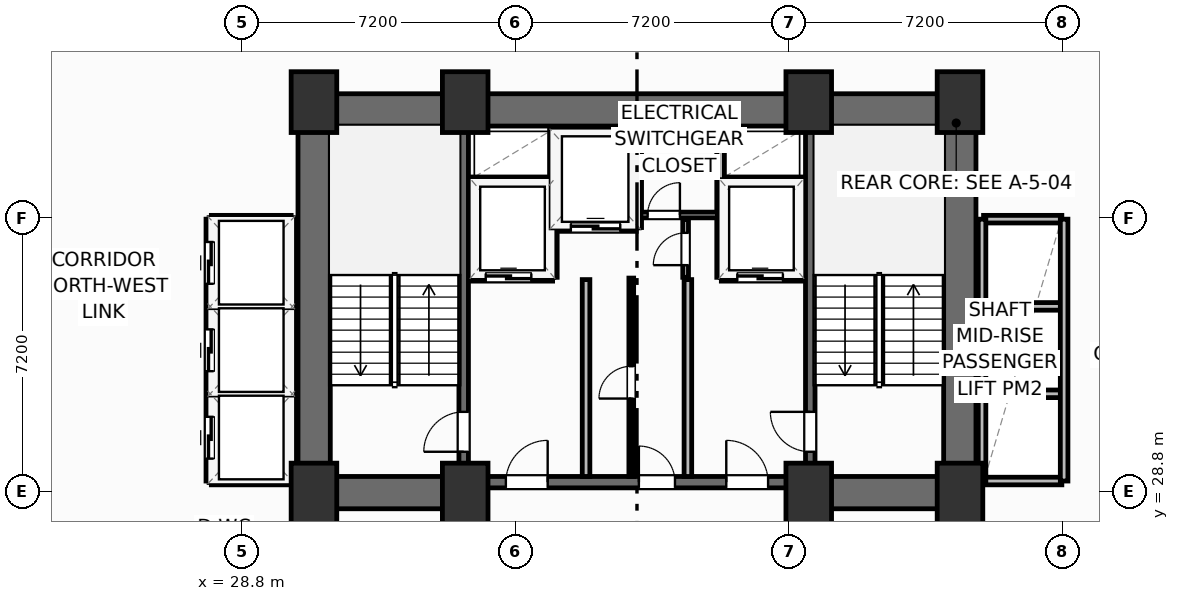
"""IFC4 building model, lengths in metres.
Left out: names, types, materials, properties, quantities, classifications, styles, units other than length and angle.
Written with IfcOpenShell. Run it as: python <this file> out.ifc"""

import sys

from ifc_helpers import new_model, si_unit, direction, frame, frame_2d, origin, origin_2d, place, context, subcontext, project, spatial, rectangle, extrude, element, fill, save


model = new_model("IFC4")
c1 = context("Model", 3, precision=1e-05, world=origin(), true_north=direction((0.0, 1.0)))
c2 = subcontext(c1, "Body", "Model", "MODEL_VIEW")
j1 = project(units=[si_unit("LENGTHUNIT", "METRE"), si_unit("PLANEANGLEUNIT", "RADIAN")], contexts=[c1])
p1 = place(None, origin())
s1 = spatial("IfcSite", under=j1, at=p1, CompositionType="ELEMENT")
p2 = place(p1, origin())
s2 = spatial("IfcBuilding", under=s1, at=p2, CompositionType="ELEMENT")
p3 = place(p2, frame((0.0, 0.0, 45.5)))
s3 = spatial("IfcBuildingStorey", under=s2, at=p3, CompositionType="ELEMENT", Elevation=45.5)
for number, where, z_axis, x_axis in (
    (1, (30.7, 28.75, 0.0), (0.0, 0.0, 1.0), (1.0, 0.0, 0.0)),
    (2, (34.68, 28.75, 0.0), (0.0, 0.0, 1.0), (1.0, 0.0, 0.0)),
    (3, (43.72, 28.75, 0.0), (0.0, 0.0, 1.0), (1.0, 0.0, 0.0)),
    (4, (47.7, 28.75, 0.0), (0.0, 0.0, 1.0), (1.0, 0.0, 0.0)),
    (5, (30.7, 39.05, 0.0), (0.0, 0.0, 1.0), (1.0, 0.0, 0.0)),
    (6, (34.68, 39.05, 0.0), (0.0, 0.0, 1.0), (1.0, 0.0, 0.0)),
    (7, (43.72, 39.05, 0.0), (0.0, 0.0, 1.0), (1.0, 0.0, 0.0)),
    (8, (47.7, 39.05, 0.0), (0.0, 0.0, 1.0), (1.0, 0.0, 0.0)),
):
    element("IfcColumn", number, at=place(p3, frame(where, z_axis=z_axis, x_axis=x_axis)), inside=s3, PredefinedType="COLUMN", context=c2, shape_type="SweptSolid", body=[
        extrude(rectangle(XDim=1.2, YDim=1.6, at=origin_2d()), origin(), (0.0, 0.0, 1.0), 3.7),
    ])
p4 = place(p3, frame((30.28, 38.845, 0.0), z_axis=(0.0, 0.0, 1.0), x_axis=(1.0, 0.0, 0.0)))
e9 = element("IfcWall", 9, at=p4, inside=s3, PredefinedType="SHEAR", context=c2, shape_type="SweptSolid", body=[
    extrude(rectangle(XDim=17.84, YDim=0.85, at=frame_2d((8.92, 0.0))), origin(), (0.0, 0.0, 1.0), 3.45),
])
for number, where, z_axis, x_axis in (
    (10, (30.705, 29.2, 0.0), (0.0, 0.0, 1.0), (0.0, 1.0, 0.0)),
    (11, (47.695, 29.2, 0.0), (0.0, 0.0, 1.0), (0.0, 1.0, 0.0)),
):
    element("IfcWall", number, at=place(p3, frame(where, z_axis=z_axis, x_axis=x_axis)), inside=s3, PredefinedType="SHEAR", context=c2, shape_type="SweptSolid", body=[
        extrude(rectangle(XDim=9.22, YDim=0.85, at=frame_2d((4.61, 0.0))), origin(), (0.0, 0.0, 1.0), 3.45),
    ])
for number, where, z_axis, x_axis in (
    (12, (30.28, 28.775, 0.0), (0.0, 0.0, 1.0), (1.0, 0.0, 0.0)),
    (13, (43.6, 28.775, 0.0), (0.0, 0.0, 1.0), (1.0, 0.0, 0.0)),
):
    element("IfcWall", number, at=place(p3, frame(where, z_axis=z_axis, x_axis=x_axis)), inside=s3, PredefinedType="SHEAR", context=c2, shape_type="SweptSolid", body=[
        extrude(rectangle(XDim=4.52, YDim=0.85, at=frame_2d((2.26, 0.0))), origin(), (0.0, 0.0, 1.0), 3.45),
    ])
p5 = place(p3, frame((34.8, 29.05, 0.0), z_axis=(0.0, 0.0, 1.0), x_axis=(1.0, 0.0, 0.0)))
e14 = element("IfcWall", 14, at=p5, inside=s3, PredefinedType="SHEAR", context=c2, shape_type="SweptSolid", body=[
    extrude(rectangle(XDim=8.8, YDim=0.3, at=frame_2d((4.4, 0.0))), origin(), (0.0, 0.0, 1.0), 3.45),
])
p6 = place(p5, frame((0.95, 0.0, 0.0)))
e15 = element("IfcOpeningElement", 15, at=p6, cuts=e14, PredefinedType="OPENING", context=c2, shape_type="SweptSolid", body=[
    extrude(rectangle(XDim=1.1, YDim=2.15, at=frame_2d((0.55, 1.075))), frame((0.0, 0.16, 0.0), z_axis=(0.0, -1.0, 0.0), x_axis=(1.0, 0.0, 0.0)), (0.0, 0.0, 1.0), 0.32),
])
p7 = place(p5, frame((6.75, 0.0, 0.0)))
e16 = element("IfcOpeningElement", 16, at=p7, cuts=e14, PredefinedType="OPENING", context=c2, shape_type="SweptSolid", body=[
    extrude(rectangle(XDim=1.1, YDim=2.15, at=frame_2d((0.55, 1.075))), frame((0.0, 0.16, 0.0), z_axis=(0.0, -1.0, 0.0), x_axis=(1.0, 0.0, 0.0)), (0.0, 0.0, 1.0), 0.32),
])
p8 = place(p5, frame((4.45, 0.0, 0.0)))
e17 = element("IfcOpeningElement", 17, at=p8, cuts=e14, PredefinedType="OPENING", context=c2, shape_type="SweptSolid", body=[
    extrude(rectangle(XDim=0.95, YDim=2.15, at=frame_2d((0.475, 1.075))), frame((0.0, 0.16, 0.0), z_axis=(0.0, -1.0, 0.0), x_axis=(1.0, 0.0, 0.0)), (0.0, 0.0, 1.0), 0.32),
])
p9 = place(p3, frame((34.64, 29.2, 0.0), z_axis=(0.0, 0.0, 1.0), x_axis=(0.0, 1.0, 0.0)))
e18 = element("IfcWall", 18, at=p9, inside=s3, PredefinedType="SHEAR", context=c2, shape_type="SweptSolid", body=[
    extrude(rectangle(XDim=9.22, YDim=0.25, at=frame_2d((4.61, 0.0))), origin(), (0.0, 0.0, 1.0), 3.45),
])
p10 = place(p9, frame((0.65, 0.0, 0.0)))
e19 = element("IfcOpeningElement", 19, at=p10, cuts=e18, PredefinedType="OPENING", context=c2, shape_type="SweptSolid", body=[
    extrude(rectangle(XDim=1.05, YDim=2.15, at=frame_2d((0.525, 1.075))), frame((0.0, 0.135, 0.0), z_axis=(0.0, -1.0, 0.0), x_axis=(1.0, 0.0, 0.0)), (0.0, 0.0, 1.0), 0.27),
])
p11 = place(p3, frame((43.76, 29.2, 0.0), z_axis=(0.0, 0.0, 1.0), x_axis=(0.0, 1.0, 0.0)))
e20 = element("IfcWall", 20, at=p11, inside=s3, PredefinedType="SHEAR", context=c2, shape_type="SweptSolid", body=[
    extrude(rectangle(XDim=9.22, YDim=0.25, at=frame_2d((4.61, 0.0))), origin(), (0.0, 0.0, 1.0), 3.45),
])
p12 = place(p11, frame((0.65, 0.0, 0.0)))
e21 = element("IfcOpeningElement", 21, at=p12, cuts=e20, PredefinedType="OPENING", context=c2, shape_type="SweptSolid", body=[
    extrude(rectangle(XDim=1.05, YDim=2.15, at=frame_2d((0.525, 1.075))), frame((0.0, 0.135, 0.0), z_axis=(0.0, -1.0, 0.0), x_axis=(1.0, 0.0, 0.0)), (0.0, 0.0, 1.0), 0.27),
])
for number, where, z_axis, x_axis in (
    (22, (37.86, 29.2, 0.0), (0.0, 0.0, 1.0), (0.0, 1.0, 0.0)),
    (23, (40.54, 29.2, 0.0), (0.0, 0.0, 1.0), (0.0, 1.0, 0.0)),
):
    element("IfcWall", number, at=place(p3, frame(where, z_axis=z_axis, x_axis=x_axis)), inside=s3, PredefinedType="PARTITIONING", context=c2, shape_type="SweptSolid", body=[
        extrude(rectangle(XDim=5.18, YDim=0.2, at=frame_2d((2.59, 0.0))), origin(), (0.0, 0.0, 1.0), 3.45),
    ])
p13 = place(p3, frame((34.8, 34.44, 0.0), z_axis=(0.0, 0.0, 1.0), x_axis=(1.0, 0.0, 0.0)))
e24 = element("IfcWall", 24, at=p13, inside=s3, PredefinedType="PARTITIONING", context=c2, shape_type="SweptSolid", body=[
    extrude(rectangle(XDim=2.18, YDim=0.2, at=frame_2d((1.09, 0.0))), origin(), (0.0, 0.0, 1.0), 3.45),
])
p14 = place(p13, frame((0.42, 0.0, 0.0)))
e25 = element("IfcOpeningElement", 25, at=p14, cuts=e24, PredefinedType="OPENING", context=c2, shape_type="SweptSolid", body=[
    extrude(rectangle(XDim=1.2, YDim=2.2, at=frame_2d((0.6, 1.1))), frame((0.0, 0.11, 0.0), z_axis=(0.0, -1.0, 0.0), x_axis=(1.0, 0.0, 0.0)), (0.0, 0.0, 1.0), 0.22),
])
p15 = place(p3, frame((34.8, 36.98, 0.0), z_axis=(0.0, 0.0, 1.0), x_axis=(1.0, 0.0, 0.0)))
e26 = element("IfcWall", 26, at=p15, inside=s3, PredefinedType="PARTITIONING", context=c2, shape_type="SweptSolid", body=[
    extrude(rectangle(XDim=2.18, YDim=0.2, at=frame_2d((1.09, 0.0))), origin(), (0.0, 0.0, 1.0), 3.45),
])
p16 = place(p3, frame((37.0, 34.44, 0.0), z_axis=(0.0, 0.0, 1.0), x_axis=(0.0, 1.0, 0.0)))
e27 = element("IfcWall", 27, at=p16, inside=s3, PredefinedType="PARTITIONING", context=c2, shape_type="SweptSolid", body=[
    extrude(rectangle(XDim=3.9, YDim=0.2, at=frame_2d((1.95, 0.0))), origin(), (0.0, 0.0, 1.0), 3.45),
])
p17 = place(p3, frame((41.42, 34.44, 0.0), z_axis=(0.0, 0.0, 1.0), x_axis=(1.0, 0.0, 0.0)))
e28 = element("IfcWall", 28, at=p17, inside=s3, PredefinedType="PARTITIONING", context=c2, shape_type="SweptSolid", body=[
    extrude(rectangle(XDim=2.18, YDim=0.2, at=frame_2d((1.09, 0.0))), origin(), (0.0, 0.0, 1.0), 3.45),
])
p18 = place(p17, frame((0.42, 0.0, 0.0)))
e29 = element("IfcOpeningElement", 29, at=p18, cuts=e28, PredefinedType="OPENING", context=c2, shape_type="SweptSolid", body=[
    extrude(rectangle(XDim=1.2, YDim=2.2, at=frame_2d((0.6, 1.1))), frame((0.0, 0.11, 0.0), z_axis=(0.0, -1.0, 0.0), x_axis=(1.0, 0.0, 0.0)), (0.0, 0.0, 1.0), 0.22),
])
p19 = place(p3, frame((41.42, 36.98, 0.0), z_axis=(0.0, 0.0, 1.0), x_axis=(1.0, 0.0, 0.0)))
e30 = element("IfcWall", 30, at=p19, inside=s3, PredefinedType="PARTITIONING", context=c2, shape_type="SweptSolid", body=[
    extrude(rectangle(XDim=2.18, YDim=0.2, at=frame_2d((1.09, 0.0))), origin(), (0.0, 0.0, 1.0), 3.45),
])
p20 = place(p3, frame((41.4, 34.44, 0.0), z_axis=(0.0, 0.0, 1.0), x_axis=(0.0, 1.0, 0.0)))
e31 = element("IfcWall", 31, at=p20, inside=s3, PredefinedType="PARTITIONING", context=c2, shape_type="SweptSolid", body=[
    extrude(rectangle(XDim=3.9, YDim=0.2, at=frame_2d((1.95, 0.0))), origin(), (0.0, 0.0, 1.0), 3.45),
])
p21 = place(p3, frame((37.06, 35.75, 0.0), z_axis=(0.0, 0.0, 1.0), x_axis=(1.0, 0.0, 0.0)))
e32 = element("IfcWall", 32, at=p21, inside=s3, PredefinedType="PARTITIONING", context=c2, shape_type="SweptSolid", body=[
    extrude(rectangle(XDim=2.12, YDim=0.2, at=frame_2d((1.06, 0.0))), origin(), (0.0, 0.0, 1.0), 3.45),
])
p22 = place(p21, frame((0.4, 0.0, 0.0)))
e33 = element("IfcOpeningElement", 33, at=p22, cuts=e32, PredefinedType="OPENING", context=c2, shape_type="SweptSolid", body=[
    extrude(rectangle(XDim=1.3, YDim=2.2, at=frame_2d((0.65, 1.1))), frame((0.0, 0.11, 0.0), z_axis=(0.0, -1.0, 0.0), x_axis=(1.0, 0.0, 0.0)), (0.0, 0.0, 1.0), 0.22),
])
p23 = place(p3, frame((39.22, 35.75, 0.0), z_axis=(0.0, 0.0, 1.0), x_axis=(0.0, 1.0, 0.0)))
e34 = element("IfcWall", 34, at=p23, inside=s3, PredefinedType="PARTITIONING", context=c2, shape_type="SweptSolid", body=[
    extrude(rectangle(XDim=2.59, YDim=0.2, at=frame_2d((1.295, 0.0))), origin(), (0.0, 0.0, 1.0), 3.45),
])
p24 = place(p3, frame((39.3, 36.08, 0.0), z_axis=(0.0, 0.0, 1.0), x_axis=(1.0, 0.0, 0.0)))
e35 = element("IfcWall", 35, at=p24, inside=s3, PredefinedType="PARTITIONING", context=c2, shape_type="SweptSolid", body=[
    extrude(rectangle(XDim=2.02, YDim=0.15, at=frame_2d((1.01, 0.0))), origin(), (0.0, 0.0, 1.0), 3.45),
])
p25 = place(p24, frame((0.18, 0.0, 0.0)))
e36 = element("IfcOpeningElement", 36, at=p25, cuts=e35, PredefinedType="OPENING", context=c2, shape_type="SweptSolid", body=[
    extrude(rectangle(XDim=0.85, YDim=2.05, at=frame_2d((0.425, 1.025))), frame((0.0, 0.085, 0.0), z_axis=(0.0, -1.0, 0.0), x_axis=(1.0, 0.0, 0.0)), (0.0, 0.0, 1.0), 0.17),
])
p26 = place(p3, frame((40.48, 34.44, 0.0), z_axis=(0.0, 0.0, 1.0), x_axis=(0.0, 1.0, 0.0)))
e37 = element("IfcWall", 37, at=p26, inside=s3, PredefinedType="PARTITIONING", context=c2, shape_type="SweptSolid", body=[
    extrude(rectangle(XDim=1.52, YDim=0.15, at=frame_2d((0.76, 0.0))), origin(), (0.0, 0.0, 1.0), 3.45),
])
p27 = place(p26, frame((0.32, 0.0, 0.0)))
e38 = element("IfcOpeningElement", 38, at=p27, cuts=e37, PredefinedType="OPENING", context=c2, shape_type="SweptSolid", body=[
    extrude(rectangle(XDim=0.85, YDim=2.05, at=frame_2d((0.425, 1.025))), frame((0.0, 0.085, 0.0), z_axis=(0.0, -1.0, 0.0), x_axis=(1.0, 0.0, 0.0)), (0.0, 0.0, 1.0), 0.17),
])
p28 = place(p3, frame((39.05, 29.2, 0.0), z_axis=(0.0, 0.0, 1.0), x_axis=(0.0, 1.0, 0.0)))
e39 = element("IfcWall", 39, at=p28, inside=s3, PredefinedType="PARTITIONING", context=c2, shape_type="SweptSolid", body=[
    extrude(rectangle(XDim=5.22, YDim=0.125, at=frame_2d((2.61, 0.0))), origin(), (0.0, 0.0, 1.0), 3.45),
])
p29 = place(p28, frame((2.05, 0.0, 0.0)))
e40 = element("IfcOpeningElement", 40, at=p29, cuts=e39, PredefinedType="OPENING", context=c2, shape_type="SweptSolid", body=[
    extrude(rectangle(XDim=0.85, YDim=2.05, at=frame_2d((0.425, 1.025))), frame((0.0, 0.073, 0.0), z_axis=(0.0, -1.0, 0.0), x_axis=(1.0, 0.0, 0.0)), (0.0, 0.0, 1.0), 0.145),
])
for number, where, z_axis, x_axis in (
    (41, (28.02, 31.375, 0.0), (0.0, 0.0, 1.0), (1.0, 0.0, 0.0)),
    (42, (28.02, 33.675, 0.0), (0.0, 0.0, 1.0), (1.0, 0.0, 0.0)),
):
    element("IfcWall", number, at=place(p3, frame(where, z_axis=z_axis, x_axis=x_axis)), inside=s3, PredefinedType="PARTITIONING", context=c2, shape_type="SweptSolid", body=[
        extrude(rectangle(XDim=2.06, YDim=0.2, at=frame_2d((1.03, 0.0))), origin(), (0.0, 0.0, 1.0), 3.45),
    ])
for number, where, z_axis, x_axis in (
    (43, (28.0, 29.08, 0.0), (0.0, 0.0, 1.0), (1.0, 0.0, 0.0)),
    (44, (28.0, 35.97, 0.0), (0.0, 0.0, 1.0), (1.0, 0.0, 0.0)),
):
    element("IfcWall", number, at=place(p3, frame(where, z_axis=z_axis, x_axis=x_axis)), inside=s3, PredefinedType="PARTITIONING", context=c2, shape_type="SweptSolid", body=[
        extrude(rectangle(XDim=2.1, YDim=0.2, at=frame_2d((1.05, 0.0))), origin(), (0.0, 0.0, 1.0), 3.45),
    ])
p30 = place(p3, frame((30.12, 29.08, 0.0), z_axis=(0.0, 0.0, 1.0), x_axis=(0.0, 1.0, 0.0)))
e45 = element("IfcWall", 45, at=p30, inside=s3, PredefinedType="PARTITIONING", context=c2, shape_type="SweptSolid", body=[
    extrude(rectangle(XDim=6.89, YDim=0.2, at=frame_2d((3.445, 0.0))), origin(), (0.0, 0.0, 1.0), 3.45),
])
p31 = place(p3, frame((27.96, 29.08, 0.0), z_axis=(0.0, 0.0, 1.0), x_axis=(0.0, 1.0, 0.0)))
e46 = element("IfcWall", 46, at=p31, inside=s3, PredefinedType="PARTITIONING", context=c2, shape_type="SweptSolid", body=[
    extrude(rectangle(XDim=6.89, YDim=0.2, at=frame_2d((3.445, 0.0))), origin(), (0.0, 0.0, 1.0), 3.45),
])
p32 = place(p31, frame((0.59, 0.0, 0.0)))
e47 = element("IfcOpeningElement", 47, at=p32, cuts=e46, PredefinedType="OPENING", context=c2, shape_type="SweptSolid", body=[
    extrude(rectangle(XDim=1.1, YDim=2.15, at=frame_2d((0.55, 1.075))), frame((0.0, 0.11, 0.0), z_axis=(0.0, -1.0, 0.0), x_axis=(1.0, 0.0, 0.0)), (0.0, 0.0, 1.0), 0.22),
])
p33 = place(p31, frame((2.89, 0.0, 0.0)))
e48 = element("IfcOpeningElement", 48, at=p33, cuts=e46, PredefinedType="OPENING", context=c2, shape_type="SweptSolid", body=[
    extrude(rectangle(XDim=1.1, YDim=2.15, at=frame_2d((0.55, 1.075))), frame((0.0, 0.11, 0.0), z_axis=(0.0, -1.0, 0.0), x_axis=(1.0, 0.0, 0.0)), (0.0, 0.0, 1.0), 0.22),
])
p34 = place(p31, frame((5.19, 0.0, 0.0)))
e49 = element("IfcOpeningElement", 49, at=p34, cuts=e46, PredefinedType="OPENING", context=c2, shape_type="SweptSolid", body=[
    extrude(rectangle(XDim=1.1, YDim=2.15, at=frame_2d((0.55, 1.075))), frame((0.0, 0.11, 0.0), z_axis=(0.0, -1.0, 0.0), x_axis=(1.0, 0.0, 0.0)), (0.0, 0.0, 1.0), 0.22),
])
for number, where, z_axis, x_axis in (
    (50, (48.32, 31.375, 0.0), (0.0, 0.0, 1.0), (1.0, 0.0, 0.0)),
    (51, (48.32, 33.675, 0.0), (0.0, 0.0, 1.0), (1.0, 0.0, 0.0)),
):
    element("IfcWall", number, at=place(p3, frame(where, z_axis=z_axis, x_axis=x_axis)), inside=s3, PredefinedType="PARTITIONING", context=c2, shape_type="SweptSolid", body=[
        extrude(rectangle(XDim=2.06, YDim=0.2, at=frame_2d((1.03, 0.0))), origin(), (0.0, 0.0, 1.0), 3.45),
    ])
p35 = place(p3, frame((48.32, 29.08, 0.0), z_axis=(0.0, 0.0, 1.0), x_axis=(1.0, 0.0, 0.0)))
e52 = element("IfcWall", 52, at=p35, inside=s3, PredefinedType="PARTITIONING", context=c2, shape_type="SweptSolid", body=[
    extrude(rectangle(XDim=2.06, YDim=0.2, at=frame_2d((1.03, 0.0))), origin(), (0.0, 0.0, 1.0), 2.662),
])
p36 = place(p3, frame((48.32, 35.97, 0.0), z_axis=(0.0, 0.0, 1.0), x_axis=(1.0, 0.0, 0.0)))
e53 = element("IfcWall", 53, at=p36, inside=s3, PredefinedType="PARTITIONING", context=c2, shape_type="SweptSolid", body=[
    extrude(rectangle(XDim=2.06, YDim=0.2, at=frame_2d((1.03, 0.0))), origin(), (0.0, 0.0, 1.0), 3.45),
])
for number, where, z_axis, x_axis in (
    (54, (48.28, 29.08, 0.0), (0.0, 0.0, 1.0), (0.0, 1.0, 0.0)),
    (55, (50.44, 29.08, 0.0), (0.0, 0.0, 1.0), (0.0, 1.0, 0.0)),
):
    element("IfcWall", number, at=place(p3, frame(where, z_axis=z_axis, x_axis=x_axis)), inside=s3, PredefinedType="PARTITIONING", context=c2, shape_type="SweptSolid", body=[
        extrude(rectangle(XDim=6.89, YDim=0.2, at=frame_2d((3.445, 0.0))), origin(), (0.0, 0.0, 1.0), 3.45),
    ])
p37 = place(p10, origin())
e56 = element("IfcDoor", 56, at=p37, inside=s3, OperationType="SINGLE_SWING_LEFT", PredefinedType="DOOR", context=c2, shape_type="SweptSolid", body=[
    extrude(rectangle(XDim=1.05, YDim=2.15, at=frame_2d((0.525, 1.075))), frame((0.0, 0.025, 0.0), z_axis=(0.0, -1.0, 0.0), x_axis=(1.0, 0.0, 0.0)), (0.0, 0.0, 1.0), 0.05),
])
fill(e19, e56)
p38 = place(p12, origin())
e57 = element("IfcDoor", 57, at=p38, inside=s3, OperationType="SINGLE_SWING_RIGHT", PredefinedType="DOOR", context=c2, shape_type="SweptSolid", body=[
    extrude(rectangle(XDim=1.05, YDim=2.15, at=frame_2d((0.525, 1.075))), frame((0.0, 0.025, 0.0), z_axis=(0.0, -1.0, 0.0), x_axis=(1.0, 0.0, 0.0)), (0.0, 0.0, 1.0), 0.05),
])
fill(e21, e57)
p39 = place(p6, origin())
e58 = element("IfcDoor", 58, at=p39, inside=s3, OperationType="SINGLE_SWING_RIGHT", PredefinedType="DOOR", context=c2, shape_type="SweptSolid", body=[
    extrude(rectangle(XDim=1.1, YDim=2.15, at=frame_2d((0.55, 1.075))), frame((0.0, 0.025, 0.0), z_axis=(0.0, -1.0, 0.0), x_axis=(1.0, 0.0, 0.0)), (0.0, 0.0, 1.0), 0.05),
])
fill(e15, e58)
p40 = place(p7, origin())
e59 = element("IfcDoor", 59, at=p40, inside=s3, OperationType="SINGLE_SWING_LEFT", PredefinedType="DOOR", context=c2, shape_type="SweptSolid", body=[
    extrude(rectangle(XDim=1.1, YDim=2.15, at=frame_2d((0.55, 1.075))), frame((0.0, 0.025, 0.0), z_axis=(0.0, -1.0, 0.0), x_axis=(1.0, 0.0, 0.0)), (0.0, 0.0, 1.0), 0.05),
])
fill(e16, e59)
p41 = place(p14, origin())
e60 = element("IfcDoor", 60, at=p41, inside=s3, OperationType="SLIDING_TO_LEFT", PredefinedType="DOOR", context=c2, shape_type="SweptSolid", body=[
    extrude(rectangle(XDim=1.2, YDim=2.2, at=frame_2d((0.6, 1.1))), frame((0.0, 0.025, 0.0), z_axis=(0.0, -1.0, 0.0), x_axis=(1.0, 0.0, 0.0)), (0.0, 0.0, 1.0), 0.05),
])
fill(e25, e60)
p42 = place(p18, origin())
e61 = element("IfcDoor", 61, at=p42, inside=s3, OperationType="SLIDING_TO_LEFT", PredefinedType="DOOR", context=c2, shape_type="SweptSolid", body=[
    extrude(rectangle(XDim=1.2, YDim=2.2, at=frame_2d((0.6, 1.1))), frame((0.0, 0.025, 0.0), z_axis=(0.0, -1.0, 0.0), x_axis=(1.0, 0.0, 0.0)), (0.0, 0.0, 1.0), 0.05),
])
fill(e29, e61)
p43 = place(p22, origin())
e62 = element("IfcDoor", 62, at=p43, inside=s3, OperationType="SLIDING_TO_LEFT", PredefinedType="DOOR", context=c2, shape_type="SweptSolid", body=[
    extrude(rectangle(XDim=1.3, YDim=2.2, at=frame_2d((0.65, 1.1))), frame((0.0, 0.025, 0.0), z_axis=(0.0, -1.0, 0.0), x_axis=(1.0, 0.0, 0.0)), (0.0, 0.0, 1.0), 0.05),
])
fill(e33, e62)
p44 = place(p25, origin())
e63 = element("IfcDoor", 63, at=p44, inside=s3, OperationType="SINGLE_SWING_RIGHT", PredefinedType="DOOR", context=c2, shape_type="SweptSolid", body=[
    extrude(rectangle(XDim=0.85, YDim=2.05, at=frame_2d((0.425, 1.025))), frame((0.0, 0.025, 0.0), z_axis=(0.0, -1.0, 0.0), x_axis=(1.0, 0.0, 0.0)), (0.0, 0.0, 1.0), 0.05),
])
fill(e36, e63)
p45 = place(p27, origin())
e64 = element("IfcDoor", 64, at=p45, inside=s3, OperationType="SINGLE_SWING_LEFT", PredefinedType="DOOR", context=c2, shape_type="SweptSolid", body=[
    extrude(rectangle(XDim=0.85, YDim=2.05, at=frame_2d((0.425, 1.025))), frame((0.0, 0.025, 0.0), z_axis=(0.0, -1.0, 0.0), x_axis=(1.0, 0.0, 0.0)), (0.0, 0.0, 1.0), 0.05),
])
fill(e38, e64)
p46 = place(p29, origin())
e65 = element("IfcDoor", 65, at=p46, inside=s3, OperationType="SINGLE_SWING_LEFT", PredefinedType="DOOR", context=c2, shape_type="SweptSolid", body=[
    extrude(rectangle(XDim=0.85, YDim=2.05, at=frame_2d((0.425, 1.025))), frame((0.0, 0.025, 0.0), z_axis=(0.0, -1.0, 0.0), x_axis=(1.0, 0.0, 0.0)), (0.0, 0.0, 1.0), 0.05),
])
fill(e40, e65)
p47 = place(p8, origin())
e66 = element("IfcDoor", 66, at=p47, inside=s3, OperationType="SINGLE_SWING_LEFT", PredefinedType="DOOR", context=c2, shape_type="SweptSolid", body=[
    extrude(rectangle(XDim=0.95, YDim=2.15, at=frame_2d((0.475, 1.075))), frame((0.0, 0.025, 0.0), z_axis=(0.0, -1.0, 0.0), x_axis=(1.0, 0.0, 0.0)), (0.0, 0.0, 1.0), 0.05),
])
fill(e17, e66)
p48 = place(p32, origin())
e67 = element("IfcDoor", 67, at=p48, inside=s3, OperationType="SLIDING_TO_LEFT", PredefinedType="DOOR", context=c2, shape_type="SweptSolid", body=[
    extrude(rectangle(XDim=1.1, YDim=2.15, at=frame_2d((0.55, 1.075))), frame((0.0, 0.025, 0.0), z_axis=(0.0, -1.0, 0.0), x_axis=(1.0, 0.0, 0.0)), (0.0, 0.0, 1.0), 0.05),
])
fill(e47, e67)
p49 = place(p33, origin())
e68 = element("IfcDoor", 68, at=p49, inside=s3, OperationType="SLIDING_TO_LEFT", PredefinedType="DOOR", context=c2, shape_type="SweptSolid", body=[
    extrude(rectangle(XDim=1.1, YDim=2.15, at=frame_2d((0.55, 1.075))), frame((0.0, 0.025, 0.0), z_axis=(0.0, -1.0, 0.0), x_axis=(1.0, 0.0, 0.0)), (0.0, 0.0, 1.0), 0.05),
])
fill(e48, e68)
p50 = place(p34, origin())
e69 = element("IfcDoor", 69, at=p50, inside=s3, OperationType="SLIDING_TO_LEFT", PredefinedType="DOOR", context=c2, shape_type="SweptSolid", body=[
    extrude(rectangle(XDim=1.1, YDim=2.15, at=frame_2d((0.55, 1.075))), frame((0.0, 0.025, 0.0), z_axis=(0.0, -1.0, 0.0), x_axis=(1.0, 0.0, 0.0)), (0.0, 0.0, 1.0), 0.05),
])
fill(e49, e69)
save(model, sys.argv[1])
